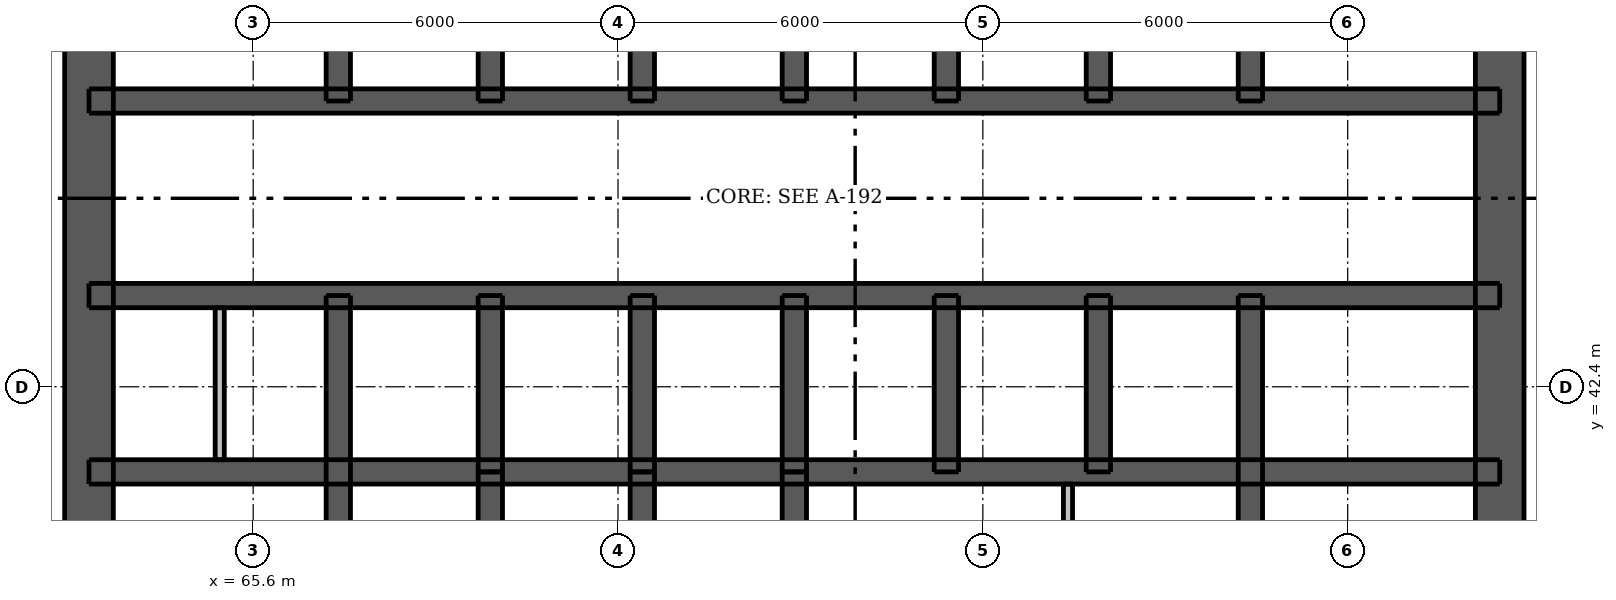
"""IFC4 building model, lengths in metres.
Left out: names, types, materials, properties, quantities, classifications, styles, units other than length and angle.
Written with IfcOpenShell. Run it as: python <this file> out.ifc"""

import sys

from ifc_helpers import new_model, si_unit, direction, frame, frame_2d, origin, place, context, subcontext, project, spatial, rectangle, extrude, element, fill, save


model = new_model("IFC4")
c1 = context("Model", 3, precision=1e-05, world=origin(), true_north=direction((0.0, 1.0)))
c2 = subcontext(c1, "Body", "Model", "MODEL_VIEW")
j1 = project(units=[si_unit("LENGTHUNIT", "METRE"), si_unit("PLANEANGLEUNIT", "RADIAN")], contexts=[c1])
p1 = place(None, origin())
s1 = spatial("IfcSite", under=j1, at=p1, CompositionType="ELEMENT")
p2 = place(p1, origin())
s2 = spatial("IfcBuilding", under=s1, at=p2, CompositionType="ELEMENT")
p3 = place(p2, frame((0.0, 0.0, 82.0)))
s3 = spatial("IfcBuildingStorey", under=s2, at=p3, CompositionType="ELEMENT", Elevation=82.0)
p4 = place(p3, frame((62.9, 33.5, 0.0), z_axis=(0.0, 0.0, 1.0), x_axis=(0.0, 1.0, 0.0)))
e1 = element("IfcWall", 1, at=p4, inside=s3, PredefinedType="SHEAR", context=c2, shape_type="SweptSolid", body=[
    extrude(rectangle(XDim=24.0, YDim=0.8, at=frame_2d((12.0, 0.0))), origin(), (0.0, 0.0, 1.0), 3.05),
])
p5 = place(p4, frame((11.2, 0.0, 0.0)))
e2 = element("IfcOpeningElement", 2, at=p5, cuts=e1, PredefinedType="OPENING", context=c2, shape_type="SweptSolid", body=[
    extrude(rectangle(XDim=1.6, YDim=2.1, at=frame_2d((0.8, 1.05))), frame((0.0, 0.41, 0.0), z_axis=(0.0, -1.0, 0.0), x_axis=(1.0, 0.0, 0.0)), (0.0, 0.0, 1.0), 0.82),
])
p6 = place(p3, frame((86.1, 33.5, 0.0), z_axis=(0.0, 0.0, 1.0), x_axis=(0.0, 1.0, 0.0)))
e3 = element("IfcWall", 3, at=p6, inside=s3, PredefinedType="SHEAR", context=c2, shape_type="SweptSolid", body=[
    extrude(rectangle(XDim=24.0, YDim=0.8, at=frame_2d((12.0, 0.0))), origin(), (0.0, 0.0, 1.0), 3.05),
])
p7 = place(p6, frame((11.2, 0.0, 0.0)))
e4 = element("IfcOpeningElement", 4, at=p7, cuts=e3, PredefinedType="OPENING", context=c2, shape_type="SweptSolid", body=[
    extrude(rectangle(XDim=1.6, YDim=2.1, at=frame_2d((0.8, 1.05))), frame((0.0, 0.41, 0.0), z_axis=(0.0, -1.0, 0.0), x_axis=(1.0, 0.0, 0.0)), (0.0, 0.0, 1.0), 0.82),
])
p8 = place(p3, frame((62.9, 41.0, 0.0), z_axis=(0.0, 0.0, 1.0), x_axis=(1.0, 0.0, 0.0)))
e5 = element("IfcWall", 5, at=p8, inside=s3, PredefinedType="SHEAR", context=c2, shape_type="SweptSolid", body=[
    extrude(rectangle(XDim=23.2, YDim=0.4, at=frame_2d((11.6, 0.0))), origin(), (0.0, 0.0, 1.0), 3.05),
])
p9 = place(p3, frame((62.9, 43.9, 0.0), z_axis=(0.0, 0.0, 1.0), x_axis=(1.0, 0.0, 0.0)))
e6 = element("IfcWall", 6, at=p9, inside=s3, PredefinedType="SHEAR", context=c2, shape_type="SweptSolid", body=[
    extrude(rectangle(XDim=23.2, YDim=0.4, at=frame_2d((11.6, 0.0))), origin(), (0.0, 0.0, 1.0), 3.05),
])
p10 = place(p9, frame((0.825, 0.0, 0.0)))
e7 = element("IfcOpeningElement", 7, at=p10, cuts=e6, PredefinedType="OPENING", context=c2, shape_type="SweptSolid", body=[
    extrude(rectangle(XDim=0.9, YDim=2.1, at=frame_2d((0.45, 1.05))), frame((0.0, 0.21, 0.0), z_axis=(0.0, -1.0, 0.0), x_axis=(1.0, 0.0, 0.0)), (0.0, 0.0, 1.0), 0.42),
])
p11 = place(p9, frame((2.575, 0.0, 0.0)))
e8 = element("IfcOpeningElement", 8, at=p11, cuts=e6, PredefinedType="OPENING", context=c2, shape_type="SweptSolid", body=[
    extrude(rectangle(XDim=0.9, YDim=2.1, at=frame_2d((0.45, 1.05))), frame((0.0, 0.21, 0.0), z_axis=(0.0, -1.0, 0.0), x_axis=(1.0, 0.0, 0.0)), (0.0, 0.0, 1.0), 0.42),
])
p12 = place(p9, frame((20.6, 0.0, 0.0)))
e9 = element("IfcOpeningElement", 9, at=p12, cuts=e6, PredefinedType="OPENING", context=c2, shape_type="SweptSolid", body=[
    extrude(rectangle(XDim=0.9, YDim=2.1, at=frame_2d((0.45, 1.05))), frame((0.0, 0.21, 0.0), z_axis=(0.0, -1.0, 0.0), x_axis=(1.0, 0.0, 0.0)), (0.0, 0.0, 1.0), 0.42),
])
p13 = place(p9, frame((4.8, 0.0, 0.0)))
e10 = element("IfcOpeningElement", 10, at=p13, cuts=e6, PredefinedType="OPENING", context=c2, shape_type="SweptSolid", body=[
    extrude(rectangle(XDim=1.1, YDim=2.1, at=frame_2d((0.55, 1.05))), frame((0.0, 0.21, 0.0), z_axis=(0.0, -1.0, 0.0), x_axis=(1.0, 0.0, 0.0)), (0.0, 0.0, 1.0), 0.42),
])
p14 = place(p9, frame((7.3, 0.0, 0.0)))
e11 = element("IfcOpeningElement", 11, at=p14, cuts=e6, PredefinedType="OPENING", context=c2, shape_type="SweptSolid", body=[
    extrude(rectangle(XDim=1.1, YDim=2.1, at=frame_2d((0.55, 1.05))), frame((0.0, 0.21, 0.0), z_axis=(0.0, -1.0, 0.0), x_axis=(1.0, 0.0, 0.0)), (0.0, 0.0, 1.0), 0.42),
])
p15 = place(p9, frame((9.8, 0.0, 0.0)))
e12 = element("IfcOpeningElement", 12, at=p15, cuts=e6, PredefinedType="OPENING", context=c2, shape_type="SweptSolid", body=[
    extrude(rectangle(XDim=1.1, YDim=2.1, at=frame_2d((0.55, 1.05))), frame((0.0, 0.21, 0.0), z_axis=(0.0, -1.0, 0.0), x_axis=(1.0, 0.0, 0.0)), (0.0, 0.0, 1.0), 0.42),
])
p16 = place(p9, frame((12.3, 0.0, 0.0)))
e13 = element("IfcOpeningElement", 13, at=p16, cuts=e6, PredefinedType="OPENING", context=c2, shape_type="SweptSolid", body=[
    extrude(rectangle(XDim=1.1, YDim=2.1, at=frame_2d((0.55, 1.05))), frame((0.0, 0.21, 0.0), z_axis=(0.0, -1.0, 0.0), x_axis=(1.0, 0.0, 0.0)), (0.0, 0.0, 1.0), 0.42),
])
p17 = place(p9, frame((14.8, 0.0, 0.0)))
e14 = element("IfcOpeningElement", 14, at=p17, cuts=e6, PredefinedType="OPENING", context=c2, shape_type="SweptSolid", body=[
    extrude(rectangle(XDim=1.1, YDim=2.1, at=frame_2d((0.55, 1.05))), frame((0.0, 0.21, 0.0), z_axis=(0.0, -1.0, 0.0), x_axis=(1.0, 0.0, 0.0)), (0.0, 0.0, 1.0), 0.42),
])
p18 = place(p9, frame((17.3, 0.0, 0.0)))
e15 = element("IfcOpeningElement", 15, at=p18, cuts=e6, PredefinedType="OPENING", context=c2, shape_type="SweptSolid", body=[
    extrude(rectangle(XDim=1.1, YDim=2.1, at=frame_2d((0.55, 1.05))), frame((0.0, 0.21, 0.0), z_axis=(0.0, -1.0, 0.0), x_axis=(1.0, 0.0, 0.0)), (0.0, 0.0, 1.0), 0.42),
])
p19 = place(p3, frame((62.9, 47.1, 0.0), z_axis=(0.0, 0.0, 1.0), x_axis=(1.0, 0.0, 0.0)))
e16 = element("IfcWall", 16, at=p19, inside=s3, PredefinedType="SHEAR", context=c2, shape_type="SweptSolid", body=[
    extrude(rectangle(XDim=23.2, YDim=0.4, at=frame_2d((11.6, 0.0))), origin(), (0.0, 0.0, 1.0), 3.05),
])
p20 = place(p19, frame((1.7, 0.0, 0.0)))
e17 = element("IfcOpeningElement", 17, at=p20, cuts=e16, PredefinedType="OPENING", context=c2, shape_type="SweptSolid", body=[
    extrude(rectangle(XDim=0.9, YDim=2.1, at=frame_2d((0.45, 1.05))), frame((0.0, 0.21, 0.0), z_axis=(0.0, -1.0, 0.0), x_axis=(1.0, 0.0, 0.0)), (0.0, 0.0, 1.0), 0.42),
])
p21 = place(p19, frame((20.6, 0.0, 0.0)))
e18 = element("IfcOpeningElement", 18, at=p21, cuts=e16, PredefinedType="OPENING", context=c2, shape_type="SweptSolid", body=[
    extrude(rectangle(XDim=0.9, YDim=2.1, at=frame_2d((0.45, 1.05))), frame((0.0, 0.21, 0.0), z_axis=(0.0, -1.0, 0.0), x_axis=(1.0, 0.0, 0.0)), (0.0, 0.0, 1.0), 0.42),
])
p22 = place(p3, frame((67.0, 33.9, 0.0), z_axis=(0.0, 0.0, 1.0), x_axis=(0.0, 1.0, 0.0)))
e19 = element("IfcWall", 19, at=p22, inside=s3, PredefinedType="SHEAR", context=c2, shape_type="SweptSolid", body=[
    extrude(rectangle(XDim=10.0, YDim=0.4, at=frame_2d((5.0, 0.0))), origin(), (0.0, 0.0, 1.0), 3.05),
])
p23 = place(p22, frame((0.6, 0.0, 0.0)))
e20 = element("IfcOpeningElement", 20, at=p23, cuts=e19, PredefinedType="OPENING", context=c2, shape_type="SweptSolid", body=[
    extrude(rectangle(XDim=1.1, YDim=2.1, at=frame_2d((0.55, 1.05))), frame((0.0, 0.21, 0.0), z_axis=(0.0, -1.0, 0.0), x_axis=(1.0, 0.0, 0.0)), (0.0, 0.0, 1.0), 0.42),
])
for number, where, z_axis, x_axis in (
    (21, (67.0, 47.1, 0.0), (0.0, 0.0, 1.0), (0.0, 1.0, 0.0)),
    (22, (82.0, 33.9, 0.0), (0.0, 0.0, 1.0), (0.0, 1.0, 0.0)),
    (23, (82.0, 47.1, 0.0), (0.0, 0.0, 1.0), (0.0, 1.0, 0.0)),
):
    element("IfcWall", number, at=place(p3, frame(where, z_axis=z_axis, x_axis=x_axis)), inside=s3, PredefinedType="SHEAR", context=c2, shape_type="SweptSolid", body=[
        extrude(rectangle(XDim=10.0, YDim=0.4, at=frame_2d((5.0, 0.0))), origin(), (0.0, 0.0, 1.0), 3.05),
    ])
for number, where, z_axis, x_axis in (
    (24, (69.5, 41.0, 0.0), (0.0, 0.0, 1.0), (0.0, 1.0, 0.0)),
    (25, (69.5, 47.1, 0.0), (0.0, 0.0, 1.0), (0.0, 1.0, 0.0)),
    (26, (72.0, 41.0, 0.0), (0.0, 0.0, 1.0), (0.0, 1.0, 0.0)),
    (27, (72.0, 47.1, 0.0), (0.0, 0.0, 1.0), (0.0, 1.0, 0.0)),
    (28, (74.5, 41.0, 0.0), (0.0, 0.0, 1.0), (0.0, 1.0, 0.0)),
    (29, (74.5, 47.1, 0.0), (0.0, 0.0, 1.0), (0.0, 1.0, 0.0)),
    (30, (77.0, 41.0, 0.0), (0.0, 0.0, 1.0), (0.0, 1.0, 0.0)),
    (31, (77.0, 47.1, 0.0), (0.0, 0.0, 1.0), (0.0, 1.0, 0.0)),
    (32, (79.5, 41.0, 0.0), (0.0, 0.0, 1.0), (0.0, 1.0, 0.0)),
    (33, (79.5, 47.1, 0.0), (0.0, 0.0, 1.0), (0.0, 1.0, 0.0)),
    (34, (69.5, 38.1, 0.0), (0.0, 0.0, 1.0), (0.0, 1.0, 0.0)),
    (35, (72.0, 38.1, 0.0), (0.0, 0.0, 1.0), (0.0, 1.0, 0.0)),
    (36, (74.5, 38.1, 0.0), (0.0, 0.0, 1.0), (0.0, 1.0, 0.0)),
):
    element("IfcWall", number, at=place(p3, frame(where, z_axis=z_axis, x_axis=x_axis)), inside=s3, PredefinedType="SHEAR", context=c2, shape_type="SweptSolid", body=[
        extrude(rectangle(XDim=2.9, YDim=0.4, at=frame_2d((1.45, 0.0))), origin(), (0.0, 0.0, 1.0), 3.05),
    ])
p24 = place(p3, frame((79.0, 34.3, 0.0), z_axis=(0.0, 0.0, 1.0), x_axis=(0.0, 1.0, 0.0)))
e37 = element("IfcWall", 37, at=p24, inside=s3, PredefinedType="PLUMBINGWALL", context=c2, shape_type="SweptSolid", body=[
    extrude(rectangle(XDim=6.5, YDim=0.15, at=frame_2d((3.25, 0.0))), origin(), (0.0, 0.0, 1.0), 3.05),
])
p25 = place(p3, frame((65.05, 41.2, 0.0), z_axis=(0.0, 0.0, 1.0), x_axis=(0.0, 1.0, 0.0)))
e38 = element("IfcWall", 38, at=p25, inside=s3, PredefinedType="PLUMBINGWALL", context=c2, shape_type="SweptSolid", body=[
    extrude(rectangle(XDim=2.5, YDim=0.15, at=frame_2d((1.25, 0.0))), origin(), (0.0, 0.0, 1.0), 3.05),
])
p26 = place(p5, origin())
e39 = element("IfcDoor", 39, at=p26, inside=s3, OperationType="DOUBLE_DOOR_SINGLE_SWING", PredefinedType="DOOR", context=c2, shape_type="SweptSolid", body=[
    extrude(rectangle(XDim=1.6, YDim=2.1, at=frame_2d((0.8, 1.05))), frame((0.0, -0.337, 0.0), z_axis=(0.0, -1.0, 0.0), x_axis=(1.0, 0.0, 0.0)), (0.0, 0.0, 1.0), 0.05),
])
fill(e2, e39)
p27 = place(p7, origin())
e40 = element("IfcDoor", 40, at=p27, inside=s3, OperationType="DOUBLE_DOOR_SINGLE_SWING", PredefinedType="DOOR", context=c2, shape_type="SweptSolid", body=[
    extrude(rectangle(XDim=1.6, YDim=2.1, at=frame_2d((0.8, 1.05))), frame((0.0, 0.388, 0.0), z_axis=(0.0, -1.0, 0.0), x_axis=(1.0, 0.0, 0.0)), (0.0, 0.0, 1.0), 0.05),
])
fill(e4, e40)
p28 = place(p10, origin())
e41 = element("IfcDoor", 41, at=p28, inside=s3, OperationType="SINGLE_SWING_LEFT", PredefinedType="DOOR", context=c2, shape_type="SweptSolid", body=[
    extrude(rectangle(XDim=0.9, YDim=2.1, at=frame_2d((0.45, 1.05))), frame((0.0, -0.138, 0.0), z_axis=(0.0, -1.0, 0.0), x_axis=(1.0, 0.0, 0.0)), (0.0, 0.0, 1.0), 0.05),
])
fill(e7, e41)
p29 = place(p11, origin())
e42 = element("IfcDoor", 42, at=p29, inside=s3, OperationType="SINGLE_SWING_RIGHT", PredefinedType="DOOR", context=c2, shape_type="SweptSolid", body=[
    extrude(rectangle(XDim=0.9, YDim=2.1, at=frame_2d((0.45, 1.05))), frame((0.0, -0.138, 0.0), z_axis=(0.0, -1.0, 0.0), x_axis=(1.0, 0.0, 0.0)), (0.0, 0.0, 1.0), 0.05),
])
fill(e8, e42)
p30 = place(p12, origin())
e43 = element("IfcDoor", 43, at=p30, inside=s3, OperationType="SINGLE_SWING_LEFT", PredefinedType="DOOR", context=c2, shape_type="SweptSolid", body=[
    extrude(rectangle(XDim=0.9, YDim=2.1, at=frame_2d((0.45, 1.05))), frame((0.0, -0.138, 0.0), z_axis=(0.0, -1.0, 0.0), x_axis=(1.0, 0.0, 0.0)), (0.0, 0.0, 1.0), 0.05),
])
fill(e9, e43)
p31 = place(p20, origin())
e44 = element("IfcDoor", 44, at=p31, inside=s3, OperationType="SINGLE_SWING_LEFT", PredefinedType="DOOR", context=c2, shape_type="SweptSolid", body=[
    extrude(rectangle(XDim=0.9, YDim=2.1, at=frame_2d((0.45, 1.05))), frame((0.0, 0.188, 0.0), z_axis=(0.0, -1.0, 0.0), x_axis=(1.0, 0.0, 0.0)), (0.0, 0.0, 1.0), 0.05),
])
fill(e17, e44)
p32 = place(p21, origin())
e45 = element("IfcDoor", 45, at=p32, inside=s3, OperationType="SINGLE_SWING_LEFT", PredefinedType="DOOR", context=c2, shape_type="SweptSolid", body=[
    extrude(rectangle(XDim=0.9, YDim=2.1, at=frame_2d((0.45, 1.05))), frame((0.0, 0.188, 0.0), z_axis=(0.0, -1.0, 0.0), x_axis=(1.0, 0.0, 0.0)), (0.0, 0.0, 1.0), 0.05),
])
fill(e18, e45)
p33 = place(p13, origin())
e46 = element("IfcDoor", 46, at=p33, inside=s3, OperationType="DOUBLE_DOOR_SLIDING", PredefinedType="DOOR", context=c2, shape_type="SweptSolid", body=[
    extrude(rectangle(XDim=1.1, YDim=2.1, at=frame_2d((0.55, 1.05))), frame((0.0, 0.025, 0.0), z_axis=(0.0, -1.0, 0.0), x_axis=(1.0, 0.0, 0.0)), (0.0, 0.0, 1.0), 0.05),
])
fill(e10, e46)
p34 = place(p14, origin())
e47 = element("IfcDoor", 47, at=p34, inside=s3, OperationType="DOUBLE_DOOR_SLIDING", PredefinedType="DOOR", context=c2, shape_type="SweptSolid", body=[
    extrude(rectangle(XDim=1.1, YDim=2.1, at=frame_2d((0.55, 1.05))), frame((0.0, 0.025, 0.0), z_axis=(0.0, -1.0, 0.0), x_axis=(1.0, 0.0, 0.0)), (0.0, 0.0, 1.0), 0.05),
])
fill(e11, e47)
p35 = place(p15, origin())
e48 = element("IfcDoor", 48, at=p35, inside=s3, OperationType="DOUBLE_DOOR_SLIDING", PredefinedType="DOOR", context=c2, shape_type="SweptSolid", body=[
    extrude(rectangle(XDim=1.1, YDim=2.1, at=frame_2d((0.55, 1.05))), frame((0.0, 0.025, 0.0), z_axis=(0.0, -1.0, 0.0), x_axis=(1.0, 0.0, 0.0)), (0.0, 0.0, 1.0), 0.05),
])
fill(e12, e48)
p36 = place(p16, origin())
e49 = element("IfcDoor", 49, at=p36, inside=s3, OperationType="DOUBLE_DOOR_SLIDING", PredefinedType="DOOR", context=c2, shape_type="SweptSolid", body=[
    extrude(rectangle(XDim=1.1, YDim=2.1, at=frame_2d((0.55, 1.05))), frame((0.0, 0.025, 0.0), z_axis=(0.0, -1.0, 0.0), x_axis=(1.0, 0.0, 0.0)), (0.0, 0.0, 1.0), 0.05),
])
fill(e13, e49)
p37 = place(p17, origin())
e50 = element("IfcDoor", 50, at=p37, inside=s3, OperationType="DOUBLE_DOOR_SLIDING", PredefinedType="DOOR", context=c2, shape_type="SweptSolid", body=[
    extrude(rectangle(XDim=1.1, YDim=2.1, at=frame_2d((0.55, 1.05))), frame((0.0, 0.025, 0.0), z_axis=(0.0, -1.0, 0.0), x_axis=(1.0, 0.0, 0.0)), (0.0, 0.0, 1.0), 0.05),
])
fill(e14, e50)
p38 = place(p18, origin())
e51 = element("IfcDoor", 51, at=p38, inside=s3, OperationType="DOUBLE_DOOR_SLIDING", PredefinedType="DOOR", context=c2, shape_type="SweptSolid", body=[
    extrude(rectangle(XDim=1.1, YDim=2.1, at=frame_2d((0.55, 1.05))), frame((0.0, 0.025, 0.0), z_axis=(0.0, -1.0, 0.0), x_axis=(1.0, 0.0, 0.0)), (0.0, 0.0, 1.0), 0.05),
])
fill(e15, e51)
save(model, sys.argv[1])
